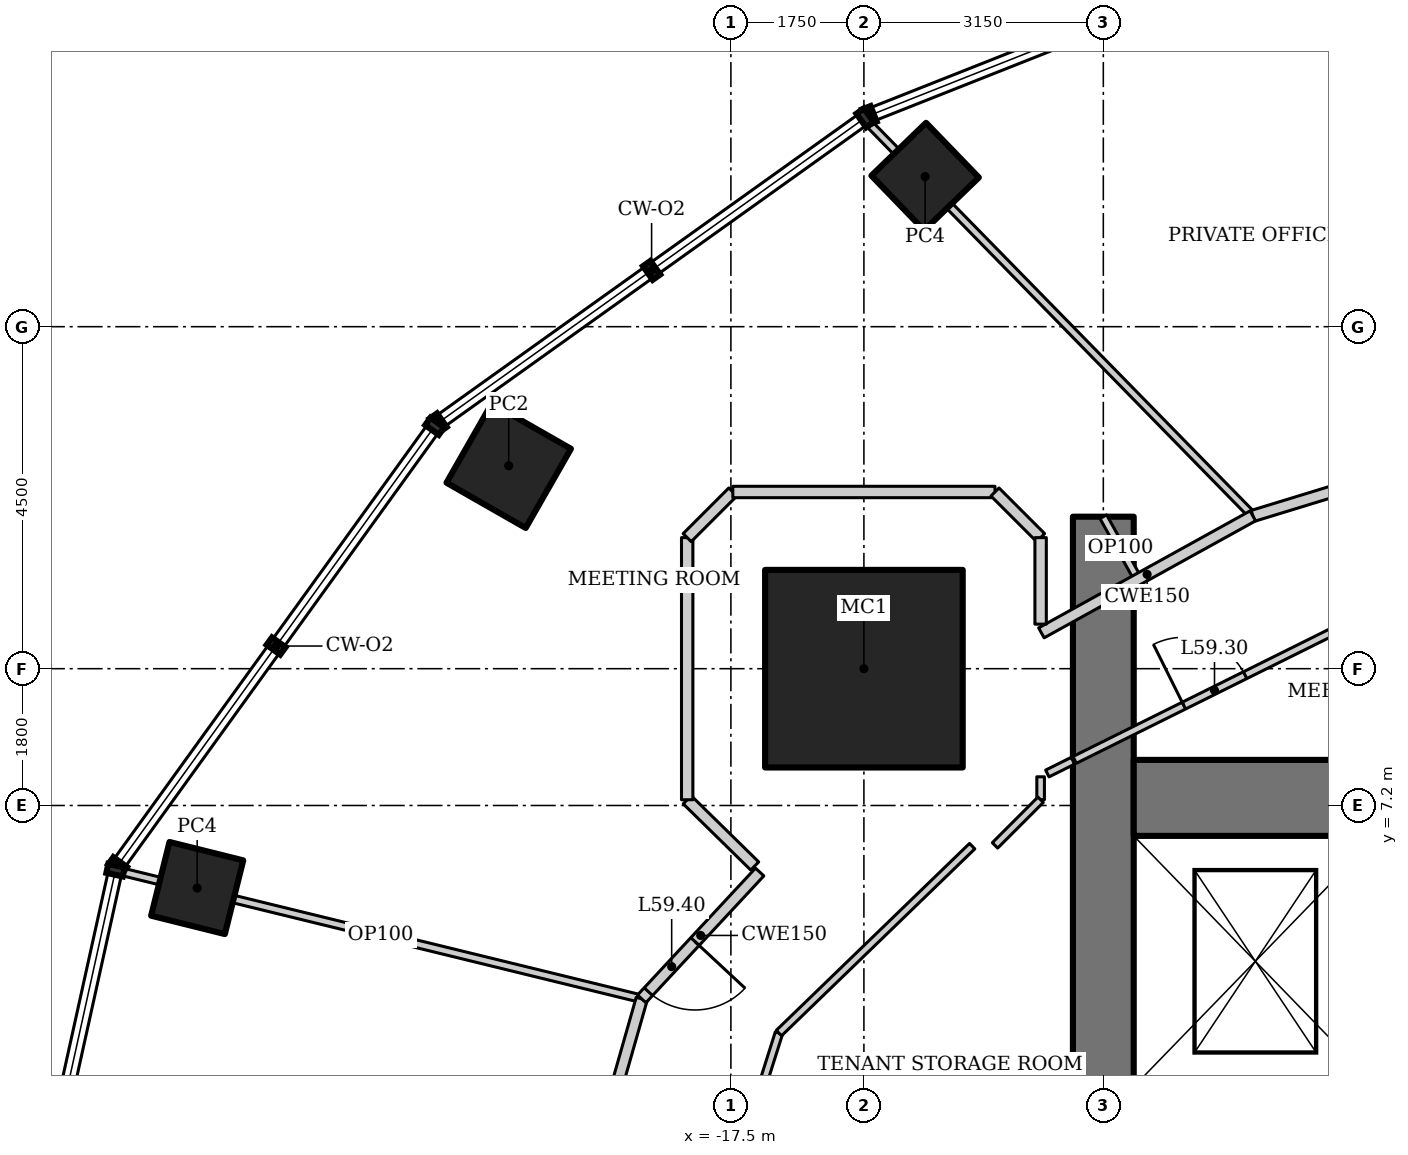
"""IFC4 building model, lengths in metres.
Left out: names, types, materials, properties, quantities, classifications, styles, units other than length and angle.
Written with IfcOpenShell. Run it as: python <this file> out.ifc"""

import sys

from ifc_helpers import new_model, si_unit, direction, frame, frame_2d, origin, origin_2d, place, context, subcontext, project, spatial, rectangle, hollow_rectangle, extrude, element, fill, save


model = new_model("IFC4")
c1 = context("Model", 3, precision=1e-05, world=origin(), true_north=direction((0.0, 1.0)))
c2 = subcontext(c1, "Body", "Model", "MODEL_VIEW")
j1 = project(units=[si_unit("LENGTHUNIT", "METRE"), si_unit("PLANEANGLEUNIT", "RADIAN")], contexts=[c1])
p1 = place(None, origin())
s1 = spatial("IfcSite", under=j1, at=p1, CompositionType="ELEMENT")
p2 = place(p1, origin())
s2 = spatial("IfcBuilding", under=s1, at=p2, CompositionType="ELEMENT")
p3 = place(p2, frame((0.0, 0.0, 253.6)))
s3 = spatial("IfcBuildingStorey", under=s2, at=p3, CompositionType="ELEMENT", Elevation=253.6)
p4 = place(p3, frame((-15.75, 9.0, 0.0), z_axis=(0.0, 0.0, 1.0), x_axis=(1.0, 0.0, 0.0)))
e1 = element("IfcColumn", 1, at=p4, inside=s3, PredefinedType="COLUMN", context=c2, shape_type="SweptSolid", body=[
    extrude(hollow_rectangle(XDim=2.6, YDim=2.6, WallThickness=0.13, at=origin_2d()), origin(), (0.0, 0.0, 1.0), 4.2),
])
for number, where, z_axis, x_axis in (
    (2, (-9.035, 17.731, 0.0), (0.0, 0.0, 1.0), (0.891, 0.454, 0.0)),
    (3, (-14.944, 15.475, 0.0), (0.0, 0.0, 1.0), (0.719, 0.695, 0.0)),
):
    element("IfcColumn", number, at=place(p3, frame(where, z_axis=z_axis, x_axis=x_axis)), inside=s3, PredefinedType="COLUMN", context=c2, shape_type="SweptSolid", body=[
        extrude(hollow_rectangle(XDim=1.0, YDim=1.0, WallThickness=0.08, at=origin_2d()), origin(), (0.0, 0.0, 1.0), 4.2),
    ])
p5 = place(p3, frame((-20.423, 11.67, 0.0), z_axis=(0.0, 0.0, 1.0), x_axis=(0.496139221777, 0.86824298017, 0.0)))
e4 = element("IfcColumn", 4, at=p5, inside=s3, PredefinedType="COLUMN", context=c2, shape_type="SweptSolid", body=[
    extrude(hollow_rectangle(XDim=1.2, YDim=1.2, WallThickness=0.1, at=origin_2d()), origin(), (0.0, 0.0, 1.0), 4.2),
])
p6 = place(p3, frame((-24.522, 6.114, 0.0), z_axis=(0.0, 0.0, 1.0), x_axis=(0.2419218956, 0.970295726276, 0.0)))
e5 = element("IfcColumn", 5, at=p6, inside=s3, PredefinedType="COLUMN", context=c2, shape_type="SweptSolid", body=[
    extrude(hollow_rectangle(XDim=1.0, YDim=1.0, WallThickness=0.08, at=origin_2d()), origin(), (0.0, 0.0, 1.0), 4.2),
])
p7 = place(p3, frame((-12.6, 11.0, 0.0), z_axis=(0.0, 0.0, 1.0), x_axis=(0.0, -1.0, 0.0)))
e6 = element("IfcWall", 6, at=p7, inside=s3, PredefinedType="SHEAR", context=c2, shape_type="SweptSolid", body=[
    extrude(rectangle(XDim=22.0, YDim=0.8, at=frame_2d((11.0, 0.0))), origin(), (0.0, 0.0, 1.0), 4.2),
])
p8 = place(p7, frame((10.1, 0.0, 0.0)))
e7 = element("IfcOpeningElement", 7, at=p8, cuts=e6, PredefinedType="OPENING", context=c2, shape_type="SweptSolid", body=[
    extrude(rectangle(XDim=1.8, YDim=2.1, at=frame_2d((0.9, 1.05))), frame((0.0, 0.41, 0.0), z_axis=(0.0, -1.0, 0.0), x_axis=(1.0, 0.0, 0.0)), (0.0, 0.0, 1.0), 0.82),
])
p9 = place(p3, frame((-5.6, 7.3, 0.0), z_axis=(0.0, 0.0, 1.0), x_axis=(-1.0, 0.0, 0.0)))
e8 = element("IfcWall", 8, at=p9, inside=s3, PredefinedType="SHEAR", context=c2, shape_type="SweptSolid", body=[
    extrude(rectangle(XDim=6.6, YDim=1.0, at=frame_2d((3.3, 0.0))), origin(), (0.0, 0.0, 1.0), 4.2),
])
p10 = place(p3, frame((-15.709, 16.199, 0.0), z_axis=(0.0, 0.0, 1.0), x_axis=(0.699362525935, -0.714767135029, 0.0)))
e9 = element("IfcWall", 9, at=p10, inside=s3, PredefinedType="PARTITIONING", context=c2, shape_type="SweptSolid", body=[
    extrude(rectangle(XDim=7.259, YDim=0.1, at=frame_2d((3.629, 0.0))), origin(), (0.0, 0.0, 1.0), 3.41),
])
p11 = place(p3, frame((-25.543, 6.335, 0.0), z_axis=(0.0, 0.0, 1.0), x_axis=(0.971384494438, -0.237512450129, 0.0)))
e10 = element("IfcWall", 10, at=p11, inside=s3, PredefinedType="PARTITIONING", context=c2, shape_type="SweptSolid", body=[
    extrude(rectangle(XDim=7.072, YDim=0.1, at=frame_2d((3.536, 0.0))), origin(), (0.0, 0.0, 1.0), 3.108),
])
p12 = place(p3, frame((-6.288, 12.341, 0.0), z_axis=(0.0, 0.0, 1.0), x_axis=(-0.956185837153, -0.292760388079, 0.0)))
e11 = element("IfcWall", 11, at=p12, inside=s3, PredefinedType="PARTITIONING", context=c2, shape_type="SweptSolid", body=[
    extrude(rectangle(XDim=4.544, YDim=0.15, at=frame_2d((2.272, 0.0))), origin(), (0.0, 0.0, 1.0), 4.05),
])
p13 = place(p12, frame((0.15, 0.0, 0.0)))
e12 = element("IfcOpeningElement", 12, at=p13, cuts=e11, PredefinedType="OPENING", context=c2, shape_type="SweptSolid", body=[
    extrude(rectangle(XDim=0.9, YDim=2.1, at=frame_2d((0.45, 1.05))), frame((0.0, 0.085, 0.0), z_axis=(0.0, -1.0, 0.0), x_axis=(1.0, 0.0, 0.0)), (0.0, 0.0, 1.0), 0.17),
])
p14 = place(p3, frame((-12.977, 7.8, 0.0), z_axis=(0.0, 0.0, 1.0), x_axis=(0.895529831139, 0.445001484874, 0.0)))
e13 = element("IfcWall", 13, at=p14, inside=s3, PredefinedType="PARTITIONING", context=c2, shape_type="SweptSolid", body=[
    extrude(rectangle(XDim=4.108, YDim=0.1, at=frame_2d((2.054, 0.0))), origin(), (0.0, 0.0, 1.0), 4.05),
])
p15 = place(p14, frame((1.604, 0.0, 0.0)))
e14 = element("IfcOpeningElement", 14, at=p15, cuts=e13, PredefinedType="OPENING", context=c2, shape_type="SweptSolid", body=[
    extrude(rectangle(XDim=0.9, YDim=2.1, at=frame_2d((0.45, 1.05))), frame((0.0, 0.06, 0.0), z_axis=(0.0, -1.0, 0.0), x_axis=(1.0, 0.0, 0.0)), (0.0, 0.0, 1.0), 0.12),
])
p16 = place(p3, frame((-13.337, 7.621, 0.0), z_axis=(0.0, 0.0, 1.0), x_axis=(0.895721570004, 0.444615416995, 0.0)))
e15 = element("IfcWall", 15, at=p16, inside=s3, PredefinedType="PARTITIONING", context=c2, shape_type="SweptSolid", body=[
    extrude(rectangle(XDim=0.376, YDim=0.1, at=frame_2d((0.188, 0.0))), origin(), (0.0, 0.0, 1.0), 4.05),
])
p17 = place(p3, frame((-12.6, 11.0, 0.0), z_axis=(0.0, 0.0, 1.0), x_axis=(0.484103558985, -0.875010710893, 0.0)))
e16 = element("IfcWall", 16, at=p17, inside=s3, PredefinedType="PARTITIONING", context=c2, shape_type="SweptSolid", body=[
    extrude(rectangle(XDim=0.943, YDim=0.1, at=frame_2d((0.472, 0.0))), origin(), (0.0, 0.0, 1.0), 4.05),
])
p18 = place(p3, frame((-18.673, 4.656, 0.0), z_axis=(0.0, 0.0, 1.0), x_axis=(-0.274067949327, -0.961710330168, 0.0)))
e17 = element("IfcWall", 17, at=p18, inside=s3, PredefinedType="PARTITIONING", context=c2, shape_type="SweptSolid", body=[
    extrude(rectangle(XDim=2.567, YDim=0.15, at=frame_2d((1.284, 0.0))), origin(), (0.0, 0.0, 1.0), 4.05),
])
p19 = place(p3, frame((-17.46, 2.335, 0.0), z_axis=(0.0, 0.0, 1.0), x_axis=(0.301821975729, 0.953364303384, 0.0)))
e18 = element("IfcWall", 18, at=p19, inside=s3, PredefinedType="PARTITIONING", context=c2, shape_type="SweptSolid", body=[
    extrude(rectangle(XDim=1.962, YDim=0.1, at=frame_2d((0.981, 0.0))), origin(), (0.0, 0.0, 1.0), 4.05),
])
p20 = place(p3, frame((-10.633, 11.01, 0.0), z_axis=(0.0, 0.0, 1.0), x_axis=(-0.875072100837, -0.483992580869, 0.0)))
e19 = element("IfcWall", 19, at=p20, inside=s3, PredefinedType="PARTITIONING", context=c2, shape_type="SweptSolid", body=[
    extrude(rectangle(XDim=3.179, YDim=0.15, at=frame_2d((1.59, 0.0))), origin(), (0.0, 0.0, 1.0), 4.05),
])
p21 = place(p3, frame((-17.121, 6.325, 0.0), z_axis=(0.0, 0.0, 1.0), x_axis=(-0.680985069419, -0.732297299755, 0.0)))
e20 = element("IfcWall", 20, at=p21, inside=s3, PredefinedType="PARTITIONING", context=c2, shape_type="SweptSolid", body=[
    extrude(rectangle(XDim=2.279, YDim=0.15, at=frame_2d((1.14, 0.0))), origin(), (0.0, 0.0, 1.0), 4.05),
])
p22 = place(p21, frame((1.25, 0.0, 0.0)))
e21 = element("IfcOpeningElement", 21, at=p22, cuts=e20, PredefinedType="OPENING", context=c2, shape_type="SweptSolid", body=[
    extrude(rectangle(XDim=0.9, YDim=2.1, at=frame_2d((0.45, 1.05))), frame((0.0, 0.085, 0.0), z_axis=(0.0, -1.0, 0.0), x_axis=(1.0, 0.0, 0.0)), (0.0, 0.0, 1.0), 0.17),
])
p23 = place(p3, frame((-16.868, 4.206, 0.0), z_axis=(0.0, 0.0, 1.0), x_axis=(0.718810161381, 0.695206409562, 0.0)))
e22 = element("IfcWall", 22, at=p23, inside=s3, PredefinedType="PARTITIONING", context=c2, shape_type="SweptSolid", body=[
    extrude(rectangle(XDim=3.537, YDim=0.1, at=frame_2d((1.769, 0.0))), origin(), (0.0, 0.0, 1.0), 4.05),
])
p24 = place(p3, frame((-13.425, 7.578, 0.0), z_axis=(0.0, 0.0, 1.0), x_axis=(0.0, -1.0, 0.0)))
e23 = element("IfcWall", 23, at=p24, inside=s3, PredefinedType="PARTITIONING", context=c2, shape_type="SweptSolid", body=[
    extrude(rectangle(XDim=0.302, YDim=0.1, at=frame_2d((0.151, 0.0))), origin(), (0.0, 0.0, 1.0), 4.05),
])
p25 = place(p3, frame((-13.425, 7.275, 0.0), z_axis=(0.0, 0.0, 1.0), x_axis=(-0.707106781187, -0.707106781187, 0.0)))
e24 = element("IfcWall", 24, at=p25, inside=s3, PredefinedType="PARTITIONING", context=c2, shape_type="SweptSolid", body=[
    extrude(rectangle(XDim=0.849, YDim=0.1, at=frame_2d((0.425, 0.0))), origin(), (0.0, 0.0, 1.0), 4.05),
])
p26 = place(p3, frame((-17.187, 6.404, 0.0), z_axis=(0.0, 0.0, 1.0), x_axis=(-0.713842064016, 0.700306723973, 0.0)))
e25 = element("IfcWall", 25, at=p26, inside=s3, PredefinedType="PARTITIONING", context=c2, shape_type="SweptSolid", body=[
    extrude(rectangle(XDim=1.245, YDim=0.15, at=frame_2d((0.622, 0.0))), origin(), (0.0, 0.0, 1.0), 4.05),
])
p27 = place(p3, frame((-18.075, 7.275, 0.0), z_axis=(0.0, 0.0, 1.0), x_axis=(0.0, 1.0, 0.0)))
e26 = element("IfcWall", 26, at=p27, inside=s3, PredefinedType="PARTITIONING", context=c2, shape_type="SweptSolid", body=[
    extrude(rectangle(XDim=3.449, YDim=0.15, at=frame_2d((1.725, 0.0))), origin(), (0.0, 0.0, 1.0), 3.6),
])
p28 = place(p3, frame((-18.075, 10.725, 0.0), z_axis=(0.0, 0.0, 1.0), x_axis=(0.707106781187, 0.707106781187, 0.0)))
e27 = element("IfcWall", 27, at=p28, inside=s3, PredefinedType="PARTITIONING", context=c2, shape_type="SweptSolid", body=[
    extrude(rectangle(XDim=0.849, YDim=0.15, at=frame_2d((0.425, 0.0))), origin(), (0.0, 0.0, 1.0), 4.05),
])
p29 = place(p3, frame((-17.475, 11.325, 0.0), z_axis=(0.0, 0.0, 1.0), x_axis=(1.0, 0.0, 0.0)))
e28 = element("IfcWall", 28, at=p29, inside=s3, PredefinedType="PARTITIONING", context=c2, shape_type="SweptSolid", body=[
    extrude(rectangle(XDim=3.449, YDim=0.15, at=frame_2d((1.725, 0.0))), origin(), (0.0, 0.0, 1.0), 4.05),
])
p30 = place(p3, frame((-14.025, 11.325, 0.0), z_axis=(0.0, 0.0, 1.0), x_axis=(0.707106781187, -0.707106781187, 0.0)))
e29 = element("IfcWall", 29, at=p30, inside=s3, PredefinedType="PARTITIONING", context=c2, shape_type="SweptSolid", body=[
    extrude(rectangle(XDim=0.849, YDim=0.15, at=frame_2d((0.425, 0.0))), origin(), (0.0, 0.0, 1.0), 4.05),
])
p31 = place(p3, frame((-13.425, 10.725, 0.0), z_axis=(0.0, 0.0, 1.0), x_axis=(0.0, -1.0, 0.0)))
e30 = element("IfcWall", 30, at=p31, inside=s3, PredefinedType="PARTITIONING", context=c2, shape_type="SweptSolid", body=[
    extrude(rectangle(XDim=1.138, YDim=0.15, at=frame_2d((0.569, 0.0))), origin(), (0.0, 0.0, 1.0), 4.05),
])
p32 = place(p15, origin())
e31 = element("IfcDoor", 31, at=p32, inside=s3, OperationType="SINGLE_SWING_LEFT", PredefinedType="DOOR", context=c2, shape_type="SweptSolid", body=[
    extrude(rectangle(XDim=0.9, YDim=2.1, at=frame_2d((0.45, 1.05))), frame((0.0, 0.025, 0.0), z_axis=(0.0, -1.0, 0.0), x_axis=(1.0, 0.0, 0.0)), (0.0, 0.0, 1.0), 0.05),
])
fill(e14, e31)
p33 = place(p22, origin())
e32 = element("IfcDoor", 32, at=p33, inside=s3, OperationType="SINGLE_SWING_LEFT", PredefinedType="DOOR", context=c2, shape_type="SweptSolid", body=[
    extrude(rectangle(XDim=0.9, YDim=2.1, at=frame_2d((0.45, 1.05))), frame((0.0, 0.025, 0.0), z_axis=(0.0, -1.0, 0.0), x_axis=(1.0, 0.0, 0.0)), (0.0, 0.0, 1.0), 0.05),
])
fill(e21, e32)
save(model, sys.argv[1])
